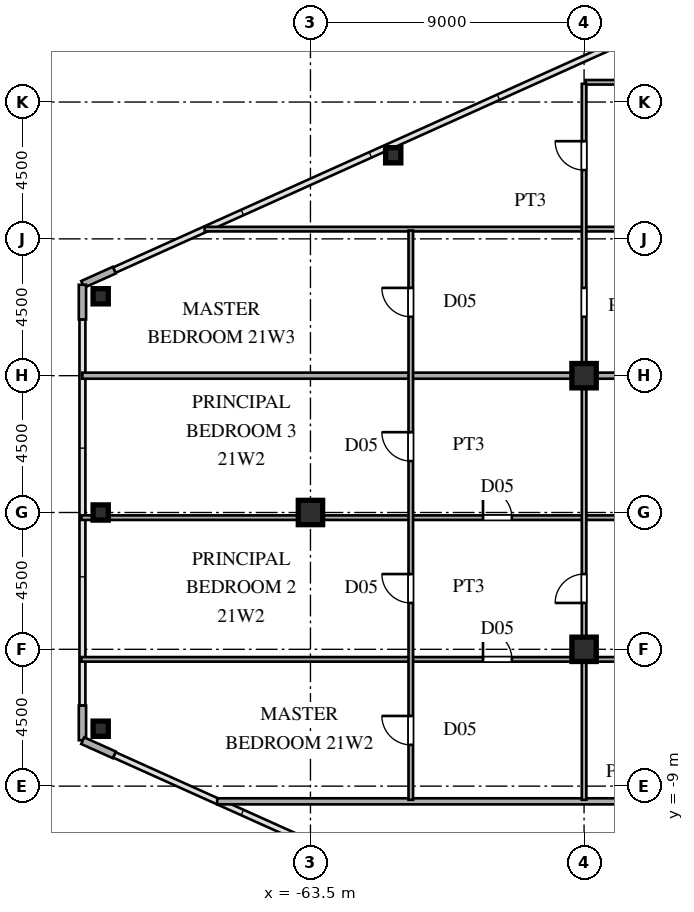
"""IFC4 building model, lengths in metres.
Left out: names, types, materials, properties, quantities, classifications, styles, units other than length and angle.
Written with IfcOpenShell. Run it as: python <this file> out.ifc"""

import sys

from ifc_helpers import new_model, si_unit, direction, frame, frame_2d, origin, origin_2d, place, context, subcontext, project, spatial, rectangle, hollow_rectangle, i_section, extrude, source, transform, mapped, element, fill, save


model = new_model("IFC4")
c1 = context("Model", 3, precision=1e-05, world=origin(), true_north=direction((0.0, 1.0)))
c2 = subcontext(c1, "Body", "Model", "MODEL_VIEW")
j1 = project(units=[si_unit("LENGTHUNIT", "METRE"), si_unit("PLANEANGLEUNIT", "RADIAN")], contexts=[c1])
p1 = place(None, origin())
s1 = spatial("IfcSite", under=j1, at=p1, CompositionType="ELEMENT")
p2 = place(p1, origin())
s2 = spatial("IfcBuilding", under=s1, at=p2, CompositionType="ELEMENT")
p3 = place(p2, frame((0.0, 0.0, 80.1)))
s3 = spatial("IfcBuildingStorey", under=s2, at=p3, CompositionType="ELEMENT", Elevation=80.1)
m1 = source(origin(), c2, "Body", "SweptSolid", [
    extrude(i_section(OverallWidth=0.8, OverallDepth=0.8, WebThickness=0.032, FlangeThickness=0.05, at=origin_2d()), origin(), (0.0, 0.0, 1.0), 3.6),
])
for number, where, z_axis, x_axis in (
    (1, (-54.5, -4.5, 0.0), (0.0, 0.0, 1.0), (1.0, 0.0, 0.0)),
    (2, (-54.5, 4.5, 0.0), (0.0, 0.0, 1.0), (1.0, 0.0, 0.0)),
    (3, (-63.5, 0.0, 0.0), (0.0, 0.0, 1.0), (1.0, 0.0, 0.0)),
):
    element("IfcColumn", number, at=place(p3, frame(where, z_axis=z_axis, x_axis=x_axis)), inside=s3, PredefinedType="COLUMN", context=c2, shape_type="MappedRepresentation", body=[
        mapped(m1, transform((0.0, 0.0, 0.0), scale=1.0)),
    ])
m2 = source(origin(), c2, "Body", "SweptSolid", [
    extrude(hollow_rectangle(XDim=0.5, YDim=0.5, WallThickness=0.02, at=origin_2d()), origin(), (0.0, 0.0, 1.0), 3.6),
])
for number, where, z_axis, x_axis in (
    (4, (-70.4, 7.112, 0.0), (0.0, 0.0, 1.0), (1.0, 0.0, 0.0)),
    (5, (-70.4, -7.112, 0.0), (0.0, 0.0, 1.0), (1.0, 0.0, 0.0)),
    (6, (-60.778, 11.749, 0.0), (0.0, 0.0, 1.0), (1.0, 0.0, 0.0)),
    (7, (-70.4, 0.0, 0.0), (0.0, 0.0, 1.0), (1.0, 0.0, 0.0)),
):
    element("IfcColumn", number, at=place(p3, frame(where, z_axis=z_axis, x_axis=x_axis)), inside=s3, PredefinedType="COLUMN", context=c2, shape_type="MappedRepresentation", body=[
        mapped(m2, transform((0.0, 0.0, 0.0), scale=1.0)),
    ])
for number, where, z_axis, x_axis in (
    (8, (-69.951, 7.972, 0.0), (0.0, 0.0, 1.0), (-0.912, -0.41, 0.0)),
    (9, (-71.0, 7.49, 0.0), (0.0, 0.0, 1.0), (0.0, -1.0, 0.0)),
    (10, (-71.0, -6.35, 0.0), (0.0, 0.0, 1.0), (0.0, -1.0, 0.0)),
    (11, (-70.991, -7.504, 0.0), (0.0, 0.0, 1.0), (0.912, -0.41, 0.0)),
):
    element("IfcWall", number, at=place(p3, frame(where, z_axis=z_axis, x_axis=x_axis)), inside=s3, PredefinedType="SOLIDWALL", context=c2, shape_type="SweptSolid", body=[
        extrude(rectangle(XDim=1.14, YDim=0.24, at=frame_2d((0.57, 0.0))), origin(), (0.0, 0.0, 1.0), 3.38),
    ])
p4 = place(p3, frame((-66.568, -9.5, 0.0), z_axis=(0.0, 0.0, 1.0), x_axis=(1.0, 0.0, 0.0)))
e12 = element("IfcWall", 12, at=p4, inside=s3, PredefinedType="PARTITIONING", context=c2, shape_type="SweptSolid", body=[
    extrude(rectangle(XDim=26.638, YDim=0.2, at=frame_2d((13.319, 0.0))), origin(), (0.0, 0.0, 1.0), 3.38),
])
p5 = place(p3, frame((-71.035, -4.83, 0.0), z_axis=(0.0, 0.0, 1.0), x_axis=(1.0, 0.0, 0.0)))
e13 = element("IfcWall", 13, at=p5, inside=s3, PredefinedType="PARTITIONING", context=c2, shape_type="SweptSolid", body=[
    extrude(rectangle(XDim=25.485, YDim=0.15, at=frame_2d((12.742, 0.0))), origin(), (0.0, 0.0, 1.0), 3.38),
])
p6 = place(p5, frame((20.56, 0.0, 0.0)))
e14 = element("IfcOpeningElement", 14, at=p6, cuts=e13, PredefinedType="OPENING", context=c2, shape_type="SweptSolid", body=[
    extrude(rectangle(XDim=0.95, YDim=2.15, at=frame_2d((0.475, 1.075))), frame((0.0, 0.085, 0.0), z_axis=(0.0, -1.0, 0.0), x_axis=(1.0, 0.0, 0.0)), (0.0, 0.0, 1.0), 0.17),
])
p7 = place(p5, frame((13.21, 0.0, 0.0)))
e15 = element("IfcOpeningElement", 15, at=p7, cuts=e13, PredefinedType="OPENING", context=c2, shape_type="SweptSolid", body=[
    extrude(rectangle(XDim=0.95, YDim=2.15, at=frame_2d((0.475, 1.075))), frame((0.0, 0.085, 0.0), z_axis=(0.0, -1.0, 0.0), x_axis=(1.0, 0.0, 0.0)), (0.0, 0.0, 1.0), 0.17),
])
p8 = place(p3, frame((-71.035, -0.17, 0.0), z_axis=(0.0, 0.0, 1.0), x_axis=(1.0, 0.0, 0.0)))
e16 = element("IfcWall", 16, at=p8, inside=s3, PredefinedType="PARTITIONING", context=c2, shape_type="SweptSolid", body=[
    extrude(rectangle(XDim=25.485, YDim=0.15, at=frame_2d((12.742, 0.0))), origin(), (0.0, 0.0, 1.0), 3.38),
])
p9 = place(p8, frame((20.56, 0.0, 0.0)))
e17 = element("IfcOpeningElement", 17, at=p9, cuts=e16, PredefinedType="OPENING", context=c2, shape_type="SweptSolid", body=[
    extrude(rectangle(XDim=0.95, YDim=2.15, at=frame_2d((0.475, 1.075))), frame((0.0, 0.085, 0.0), z_axis=(0.0, -1.0, 0.0), x_axis=(1.0, 0.0, 0.0)), (0.0, 0.0, 1.0), 0.17),
])
p10 = place(p8, frame((13.21, 0.0, 0.0)))
e18 = element("IfcOpeningElement", 18, at=p10, cuts=e16, PredefinedType="OPENING", context=c2, shape_type="SweptSolid", body=[
    extrude(rectangle(XDim=0.95, YDim=2.15, at=frame_2d((0.475, 1.075))), frame((0.0, 0.085, 0.0), z_axis=(0.0, -1.0, 0.0), x_axis=(1.0, 0.0, 0.0)), (0.0, 0.0, 1.0), 0.17),
])
p11 = place(p3, frame((-71.005, 4.5, 0.0), z_axis=(0.0, 0.0, 1.0), x_axis=(1.0, 0.0, 0.0)))
e19 = element("IfcWall", 19, at=p11, inside=s3, PredefinedType="PARTITIONING", context=c2, shape_type="SweptSolid", body=[
    extrude(rectangle(XDim=16.485, YDim=0.2, at=frame_2d((8.242, 0.0))), origin(), (0.0, 0.0, 1.0), 3.38),
])
p12 = place(p3, frame((-54.52, 4.5, 0.0), z_axis=(0.0, 0.0, 1.0), x_axis=(1.0, 0.0, 0.0)))
e20 = element("IfcWall", 20, at=p12, inside=s3, PredefinedType="PARTITIONING", context=c2, shape_type="SweptSolid", body=[
    extrude(rectangle(XDim=14.59, YDim=0.2, at=frame_2d((7.295, 0.0))), origin(), (0.0, 0.0, 1.0), 2.68),
])
p13 = place(p3, frame((-66.979, 9.32, 0.0), z_axis=(0.0, 0.0, 1.0), x_axis=(1.0, 0.0, 0.0)))
e21 = element("IfcWall", 21, at=p13, inside=s3, PredefinedType="PARTITIONING", context=c2, shape_type="SweptSolid", body=[
    extrude(rectangle(XDim=21.429, YDim=0.15, at=frame_2d((10.714, 0.0))), origin(), (0.0, 0.0, 1.0), 3.38),
])
p14 = place(p13, frame((16.504, 0.0, 0.0)))
e22 = element("IfcOpeningElement", 22, at=p14, cuts=e21, PredefinedType="OPENING", context=c2, shape_type="SweptSolid", body=[
    extrude(rectangle(XDim=0.95, YDim=2.15, at=frame_2d((0.475, 1.075))), frame((0.0, 0.085, 0.0), z_axis=(0.0, -1.0, 0.0), x_axis=(1.0, 0.0, 0.0)), (0.0, 0.0, 1.0), 0.17),
])
p15 = place(p3, frame((-54.45, 14.15, 0.0), z_axis=(0.0, 0.0, 1.0), x_axis=(1.0, 0.0, 0.0)))
e23 = element("IfcWall", 23, at=p15, inside=s3, PredefinedType="PARTITIONING", context=c2, shape_type="SweptSolid", body=[
    extrude(rectangle(XDim=8.9, YDim=0.15, at=frame_2d((4.45, 0.0))), origin(), (0.0, 0.0, 1.0), 3.38),
])
p16 = place(p15, frame((3.975, 0.0, 0.0)))
e24 = element("IfcOpeningElement", 24, at=p16, cuts=e23, PredefinedType="OPENING", context=c2, shape_type="SweptSolid", body=[
    extrude(rectangle(XDim=0.95, YDim=2.15, at=frame_2d((0.475, 1.075))), frame((0.0, 0.085, 0.0), z_axis=(0.0, -1.0, 0.0), x_axis=(1.0, 0.0, 0.0)), (0.0, 0.0, 1.0), 0.17),
])
p17 = place(p3, frame((-60.2, -9.45, 0.0), z_axis=(0.0, 0.0, 1.0), x_axis=(0.0, 1.0, 0.0)))
e25 = element("IfcWall", 25, at=p17, inside=s3, PredefinedType="PARTITIONING", context=c2, shape_type="SweptSolid", body=[
    extrude(rectangle(XDim=18.725, YDim=0.15, at=frame_2d((9.362, 0.0))), origin(), (0.0, 0.0, 1.0), 3.38),
])
p18 = place(p17, frame((1.808, 0.0, 0.0)))
e26 = element("IfcOpeningElement", 26, at=p18, cuts=e25, PredefinedType="OPENING", context=c2, shape_type="SweptSolid", body=[
    extrude(rectangle(XDim=0.95, YDim=2.15, at=frame_2d((0.475, 1.075))), frame((0.0, 0.085, 0.0), z_axis=(0.0, -1.0, 0.0), x_axis=(1.0, 0.0, 0.0)), (0.0, 0.0, 1.0), 0.17),
])
p19 = place(p17, frame((6.475, 0.0, 0.0)))
e27 = element("IfcOpeningElement", 27, at=p19, cuts=e25, PredefinedType="OPENING", context=c2, shape_type="SweptSolid", body=[
    extrude(rectangle(XDim=0.95, YDim=2.15, at=frame_2d((0.475, 1.075))), frame((0.0, 0.085, 0.0), z_axis=(0.0, -1.0, 0.0), x_axis=(1.0, 0.0, 0.0)), (0.0, 0.0, 1.0), 0.17),
])
p20 = place(p17, frame((11.142, 0.0, 0.0)))
e28 = element("IfcOpeningElement", 28, at=p20, cuts=e25, PredefinedType="OPENING", context=c2, shape_type="SweptSolid", body=[
    extrude(rectangle(XDim=0.95, YDim=2.15, at=frame_2d((0.475, 1.075))), frame((0.0, 0.085, 0.0), z_axis=(0.0, -1.0, 0.0), x_axis=(1.0, 0.0, 0.0)), (0.0, 0.0, 1.0), 0.17),
])
p21 = place(p17, frame((15.887, 0.0, 0.0)))
e29 = element("IfcOpeningElement", 29, at=p21, cuts=e25, PredefinedType="OPENING", context=c2, shape_type="SweptSolid", body=[
    extrude(rectangle(XDim=0.95, YDim=2.15, at=frame_2d((0.475, 1.075))), frame((0.0, 0.085, 0.0), z_axis=(0.0, -1.0, 0.0), x_axis=(1.0, 0.0, 0.0)), (0.0, 0.0, 1.0), 0.17),
])
p22 = place(p3, frame((-54.5, -9.45, 0.0), z_axis=(0.0, 0.0, 1.0), x_axis=(0.0, 1.0, 0.0)))
e30 = element("IfcWall", 30, at=p22, inside=s3, PredefinedType="PARTITIONING", context=c2, shape_type="SweptSolid", body=[
    extrude(rectangle(XDim=23.55, YDim=0.15, at=frame_2d((11.775, 0.0))), origin(), (0.0, 0.0, 1.0), 2.68),
])
p23 = place(p22, frame((6.475, 0.0, 0.0)))
e31 = element("IfcOpeningElement", 31, at=p23, cuts=e30, PredefinedType="OPENING", context=c2, shape_type="SweptSolid", body=[
    extrude(rectangle(XDim=0.95, YDim=2.15, at=frame_2d((0.475, 1.075))), frame((0.0, 0.085, 0.0), z_axis=(0.0, -1.0, 0.0), x_axis=(1.0, 0.0, 0.0)), (0.0, 0.0, 1.0), 0.17),
])
p24 = place(p22, frame((20.712, 0.0, 0.0)))
e32 = element("IfcOpeningElement", 32, at=p24, cuts=e30, PredefinedType="OPENING", context=c2, shape_type="SweptSolid", body=[
    extrude(rectangle(XDim=0.95, YDim=2.15, at=frame_2d((0.475, 1.075))), frame((0.0, 0.085, 0.0), z_axis=(0.0, -1.0, 0.0), x_axis=(1.0, 0.0, 0.0)), (0.0, 0.0, 1.0), 0.17),
])
p25 = place(p22, frame((15.887, 0.0, 0.0)))
e33 = element("IfcOpeningElement", 33, at=p25, cuts=e30, PredefinedType="OPENING", context=c2, shape_type="SweptSolid", body=[
    extrude(rectangle(XDim=0.95, YDim=2.15, at=frame_2d((0.475, 1.075))), frame((0.0, 0.085, 0.0), z_axis=(0.0, -1.0, 0.0), x_axis=(1.0, 0.0, 0.0)), (0.0, 0.0, 1.0), 0.17),
])
m3 = source(origin(), c2, "Body", "SweptSolid", [
    extrude(rectangle(XDim=0.95, YDim=2.15, at=frame_2d((0.475, 1.075))), frame((0.0, 0.025, 0.0), z_axis=(0.0, -1.0, 0.0), x_axis=(1.0, 0.0, 0.0)), (0.0, 0.0, 1.0), 0.05),
])
p26 = place(p7, origin())
e34 = element("IfcDoor", 34, at=p26, inside=s3, OperationType="SINGLE_SWING_LEFT", PredefinedType="DOOR", context=c2, shape_type="MappedRepresentation", body=[
    mapped(m3, transform((0.0, 0.0, 0.0), scale=1.0)),
])
fill(e15, e34)
p27 = place(p10, origin())
e35 = element("IfcDoor", 35, at=p27, inside=s3, OperationType="SINGLE_SWING_LEFT", PredefinedType="DOOR", context=c2, shape_type="MappedRepresentation", body=[
    mapped(m3, transform((0.0, 0.0, 0.0), scale=1.0)),
])
fill(e18, e35)
p28 = place(p18, origin())
e36 = element("IfcDoor", 36, at=p28, inside=s3, OperationType="SINGLE_SWING_RIGHT", PredefinedType="DOOR", context=c2, shape_type="MappedRepresentation", body=[
    mapped(m3, transform((0.0, 0.0, 0.0), scale=1.0)),
])
fill(e26, e36)
p29 = place(p19, origin())
e37 = element("IfcDoor", 37, at=p29, inside=s3, OperationType="SINGLE_SWING_RIGHT", PredefinedType="DOOR", context=c2, shape_type="MappedRepresentation", body=[
    mapped(m3, transform((0.0, 0.0, 0.0), scale=1.0)),
])
fill(e27, e37)
p30 = place(p20, origin())
e38 = element("IfcDoor", 38, at=p30, inside=s3, OperationType="SINGLE_SWING_RIGHT", PredefinedType="DOOR", context=c2, shape_type="MappedRepresentation", body=[
    mapped(m3, transform((0.0, 0.0, 0.0), scale=1.0)),
])
fill(e28, e38)
p31 = place(p21, origin())
e39 = element("IfcDoor", 39, at=p31, inside=s3, OperationType="SINGLE_SWING_RIGHT", PredefinedType="DOOR", context=c2, shape_type="MappedRepresentation", body=[
    mapped(m3, transform((0.0, 0.0, 0.0), scale=1.0)),
])
fill(e29, e39)
p32 = place(p23, origin())
e40 = element("IfcDoor", 40, at=p32, inside=s3, OperationType="SINGLE_SWING_LEFT", PredefinedType="DOOR", context=c2, shape_type="MappedRepresentation", body=[
    mapped(m3, transform((0.0, 0.0, 0.0), scale=1.0)),
])
fill(e31, e40)
p33 = place(p24, origin())
e41 = element("IfcDoor", 41, at=p33, inside=s3, OperationType="SINGLE_SWING_RIGHT", PredefinedType="DOOR", context=c2, shape_type="MappedRepresentation", body=[
    mapped(m3, transform((0.0, 0.0, 0.0), scale=1.0)),
])
fill(e32, e41)
save(model, sys.argv[1])
